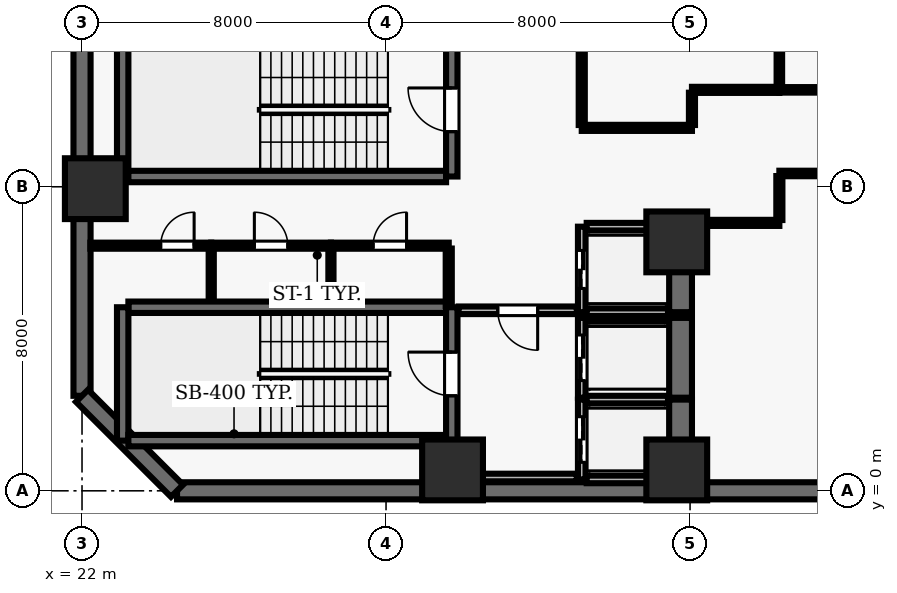
"""IFC4 building model, lengths in metres.
Left out: names, types, materials, properties, quantities, classifications, styles, units other than length and angle.
Written with IfcOpenShell. Run it as: python <this file> out.ifc"""

import sys

from ifc_helpers import new_model, si_unit, direction, frame, frame_2d, origin, origin_2d, place, context, subcontext, project, spatial, rectangle, extrude, element, fill, save


model = new_model("IFC4")
c1 = context("Model", 3, precision=1e-05, world=origin(), true_north=direction((0.0, 1.0)))
c2 = subcontext(c1, "Body", "Model", "MODEL_VIEW")
j1 = project(units=[si_unit("LENGTHUNIT", "METRE"), si_unit("PLANEANGLEUNIT", "RADIAN")], contexts=[c1])
p1 = place(None, origin())
s1 = spatial("IfcSite", under=j1, at=p1, CompositionType="ELEMENT")
p2 = place(p1, origin())
s2 = spatial("IfcBuilding", under=s1, at=p2, CompositionType="ELEMENT")
p3 = place(p2, frame((0.0, 0.0, -9.0)))
s3 = spatial("IfcBuildingStorey", under=s2, at=p3, CompositionType="ELEMENT", Elevation=-9.0)
for number, where, z_axis, x_axis in (
    (1, (31.75, 0.55, 0.0), (0.0, 0.0, 1.0), (1.0, 0.0, 0.0)),
    (2, (37.65, 0.55, 0.0), (0.0, 0.0, 1.0), (1.0, 0.0, 0.0)),
    (3, (22.35, 7.95, 0.0), (0.0, 0.0, 1.0), (1.0, 0.0, 0.0)),
    (4, (37.65, 6.55, 0.0), (0.0, 0.0, 1.0), (1.0, 0.0, 0.0)),
):
    element("IfcColumn", number, at=place(p3, frame(where, z_axis=z_axis, x_axis=x_axis)), inside=s3, PredefinedType="COLUMN", context=c2, shape_type="SweptSolid", body=[
        extrude(rectangle(XDim=1.6, YDim=1.6, at=origin_2d()), origin(), (0.0, 0.0, 1.0), 4.5),
    ])
for number, where, z_axis, x_axis in (
    (5, (24.5, 0.0, 0.0), (0.0, 0.0, 1.0), (1.0, 0.0, 0.0)),
    (6, (22.0, 51.5, 0.0), (0.0, 0.0, 1.0), (0.0, -1.0, 0.0)),
):
    element("IfcWall", number, at=place(p3, frame(where, z_axis=z_axis, x_axis=x_axis)), inside=s3, PredefinedType="USERDEFINED", context=c2, shape_type="SweptSolid", body=[
        extrude(rectangle(XDim=49.0, YDim=0.45, at=frame_2d((24.5, 0.0))), origin(), (0.0, 0.0, 1.0), 4.22),
    ])
p4 = place(p3, frame((22.0, 2.5, 0.0), z_axis=(0.0, 0.0, 1.0), x_axis=(0.707106781187, -0.707106781187, 0.0)))
e7 = element("IfcWall", 7, at=p4, inside=s3, PredefinedType="USERDEFINED", context=c2, shape_type="SweptSolid", body=[
    extrude(rectangle(XDim=3.536, YDim=0.45, at=frame_2d((1.768, 0.0))), origin(), (0.0, 0.0, 1.0), 4.22),
])
p5 = place(p3, frame((31.58, 4.83, 0.0), z_axis=(0.0, 0.0, 1.0), x_axis=(-1.0, 0.0, 0.0)))
e8 = element("IfcWall", 8, at=p5, inside=s3, PredefinedType="SHEAR", context=c2, shape_type="SweptSolid", body=[
    extrude(rectangle(XDim=8.36, YDim=0.3, at=frame_2d((4.18, 0.0))), origin(), (0.0, 0.0, 1.0), 4.22),
])
p6 = place(p3, frame((23.07, 4.83, 0.0), z_axis=(0.0, 0.0, 1.0), x_axis=(0.0, -1.0, 0.0)))
e9 = element("IfcWall", 9, at=p6, inside=s3, PredefinedType="SHEAR", context=c2, shape_type="SweptSolid", body=[
    extrude(rectangle(XDim=3.51, YDim=0.3, at=frame_2d((1.755, 0.0))), origin(), (0.0, 0.0, 1.0), 4.22),
])
p7 = place(p3, frame((23.22, 1.32, 0.0), z_axis=(0.0, 0.0, 1.0), x_axis=(1.0, 0.0, 0.0)))
e10 = element("IfcWall", 10, at=p7, inside=s3, PredefinedType="SHEAR", context=c2, shape_type="SweptSolid", body=[
    extrude(rectangle(XDim=8.36, YDim=0.3, at=frame_2d((4.18, 0.0))), origin(), (0.0, 0.0, 1.0), 4.22),
])
p8 = place(p3, frame((31.73, 0.96, 0.0), z_axis=(0.0, 0.0, 1.0), x_axis=(0.0, 1.0, 0.0)))
e11 = element("IfcWall", 11, at=p8, inside=s3, PredefinedType="SHEAR", context=c2, shape_type="SweptSolid", body=[
    extrude(rectangle(XDim=3.87, YDim=0.3, at=frame_2d((1.935, 0.0))), origin(), (0.0, 0.0, 1.0), 4.22),
])
p9 = place(p8, frame((1.54, 0.0, 0.0)))
e12 = element("IfcOpeningElement", 12, at=p9, cuts=e11, PredefinedType="OPENING", context=c2, shape_type="SweptSolid", body=[
    extrude(rectangle(XDim=1.15, YDim=2.15, at=frame_2d((0.575, 1.075))), frame((0.0, 0.16, 0.0), z_axis=(0.0, -1.0, 0.0), x_axis=(1.0, 0.0, 0.0)), (0.0, 0.0, 1.0), 0.32),
])
p10 = place(p3, frame((23.07, 11.78, 0.0), z_axis=(0.0, 0.0, 1.0), x_axis=(0.0, -1.0, 0.0)))
e13 = element("IfcWall", 13, at=p10, inside=s3, PredefinedType="SHEAR", context=c2, shape_type="SweptSolid", body=[
    extrude(rectangle(XDim=3.51, YDim=0.3, at=frame_2d((1.755, 0.0))), origin(), (0.0, 0.0, 1.0), 4.22),
])
p11 = place(p3, frame((23.22, 8.27, 0.0), z_axis=(0.0, 0.0, 1.0), x_axis=(1.0, 0.0, 0.0)))
e14 = element("IfcWall", 14, at=p11, inside=s3, PredefinedType="SHEAR", context=c2, shape_type="SweptSolid", body=[
    extrude(rectangle(XDim=8.36, YDim=0.3, at=frame_2d((4.18, 0.0))), origin(), (0.0, 0.0, 1.0), 4.22),
])
p12 = place(p3, frame((31.73, 8.27, 0.0), z_axis=(0.0, 0.0, 1.0), x_axis=(0.0, 1.0, 0.0)))
e15 = element("IfcWall", 15, at=p12, inside=s3, PredefinedType="SHEAR", context=c2, shape_type="SweptSolid", body=[
    extrude(rectangle(XDim=3.51, YDim=0.3, at=frame_2d((1.755, 0.0))), origin(), (0.0, 0.0, 1.0), 4.22),
])
p13 = place(p12, frame((1.18, 0.0, 0.0)))
e16 = element("IfcOpeningElement", 16, at=p13, cuts=e15, PredefinedType="OPENING", context=c2, shape_type="SweptSolid", body=[
    extrude(rectangle(XDim=1.15, YDim=2.15, at=frame_2d((0.575, 1.075))), frame((0.0, 0.16, 0.0), z_axis=(0.0, -1.0, 0.0), x_axis=(1.0, 0.0, 0.0)), (0.0, 0.0, 1.0), 0.32),
])
p14 = place(p3, frame((35.15, 2.4, 0.0), z_axis=(0.0, 0.0, 1.0), x_axis=(0.0, -1.0, 0.0)))
e17 = element("IfcWall", 17, at=p14, inside=s3, PredefinedType="SOLIDWALL", context=c2, shape_type="SweptSolid", body=[
    extrude(rectangle(XDim=2.1, YDim=0.2, at=frame_2d((1.05, 0.0))), origin(), (0.0, 0.0, 1.0), 4.22),
])
p15 = place(p14, frame((0.45, 0.0, 0.0)))
e18 = element("IfcOpeningElement", 18, at=p15, cuts=e17, PredefinedType="OPENING", context=c2, shape_type="SweptSolid", body=[
    extrude(rectangle(XDim=1.2, YDim=2.15, at=frame_2d((0.6, 1.075))), frame((0.0, 0.11, 0.0), z_axis=(0.0, -1.0, 0.0), x_axis=(1.0, 0.0, 0.0)), (0.0, 0.0, 1.0), 0.22),
])
p16 = place(p3, frame((37.75, 0.3, 0.0), z_axis=(0.0, 0.0, 1.0), x_axis=(0.0, 1.0, 0.0)))
e19 = element("IfcWall", 19, at=p16, inside=s3, PredefinedType="SHEAR", context=c2, shape_type="SweptSolid", body=[
    extrude(rectangle(XDim=2.1, YDim=0.6, at=frame_2d((1.05, 0.0))), origin(), (0.0, 0.0, 1.0), 4.22),
])
for number, where, z_axis, x_axis in (
    (20, (35.28, 0.3, 0.0), (0.0, 0.0, 1.0), (1.0, 0.0, 0.0)),
    (21, (37.42, 2.4, 0.0), (0.0, 0.0, 1.0), (-1.0, 0.0, 0.0)),
):
    element("IfcWall", number, at=place(p3, frame(where, z_axis=z_axis, x_axis=x_axis)), inside=s3, PredefinedType="SOLIDWALL", context=c2, shape_type="SweptSolid", body=[
        extrude(rectangle(XDim=2.14, YDim=0.2, at=frame_2d((1.07, 0.0))), origin(), (0.0, 0.0, 1.0), 4.22),
    ])
p17 = place(p3, frame((35.15, 4.55, 0.0), z_axis=(0.0, 0.0, 1.0), x_axis=(0.0, -1.0, 0.0)))
e22 = element("IfcWall", 22, at=p17, inside=s3, PredefinedType="SOLIDWALL", context=c2, shape_type="SweptSolid", body=[
    extrude(rectangle(XDim=2.1, YDim=0.2, at=frame_2d((1.05, 0.0))), origin(), (0.0, 0.0, 1.0), 4.22),
])
p18 = place(p17, frame((0.45, 0.0, 0.0)))
e23 = element("IfcOpeningElement", 23, at=p18, cuts=e22, PredefinedType="OPENING", context=c2, shape_type="SweptSolid", body=[
    extrude(rectangle(XDim=1.2, YDim=2.15, at=frame_2d((0.6, 1.075))), frame((0.0, 0.11, 0.0), z_axis=(0.0, -1.0, 0.0), x_axis=(1.0, 0.0, 0.0)), (0.0, 0.0, 1.0), 0.22),
])
p19 = place(p3, frame((37.75, 2.45, 0.0), z_axis=(0.0, 0.0, 1.0), x_axis=(0.0, 1.0, 0.0)))
e24 = element("IfcWall", 24, at=p19, inside=s3, PredefinedType="SHEAR", context=c2, shape_type="SweptSolid", body=[
    extrude(rectangle(XDim=2.1, YDim=0.6, at=frame_2d((1.05, 0.0))), origin(), (0.0, 0.0, 1.0), 4.22),
])
p20 = place(p3, frame((37.42, 4.55, 0.0), z_axis=(0.0, 0.0, 1.0), x_axis=(-1.0, 0.0, 0.0)))
e25 = element("IfcWall", 25, at=p20, inside=s3, PredefinedType="SOLIDWALL", context=c2, shape_type="SweptSolid", body=[
    extrude(rectangle(XDim=2.14, YDim=0.2, at=frame_2d((1.07, 0.0))), origin(), (0.0, 0.0, 1.0), 4.22),
])
p21 = place(p3, frame((35.15, 6.95, 0.0), z_axis=(0.0, 0.0, 1.0), x_axis=(0.0, -1.0, 0.0)))
e26 = element("IfcWall", 26, at=p21, inside=s3, PredefinedType="SOLIDWALL", context=c2, shape_type="SweptSolid", body=[
    extrude(rectangle(XDim=2.25, YDim=0.2, at=frame_2d((1.125, 0.0))), origin(), (0.0, 0.0, 1.0), 4.22),
])
p22 = place(p21, frame((0.625, 0.0, 0.0)))
e27 = element("IfcOpeningElement", 27, at=p22, cuts=e26, PredefinedType="OPENING", context=c2, shape_type="SweptSolid", body=[
    extrude(rectangle(XDim=1.0, YDim=2.1, at=frame_2d((0.5, 1.05))), frame((0.0, 0.11, 0.0), z_axis=(0.0, -1.0, 0.0), x_axis=(1.0, 0.0, 0.0)), (0.0, 0.0, 1.0), 0.22),
])
p23 = place(p3, frame((37.75, 4.7, 0.0), z_axis=(0.0, 0.0, 1.0), x_axis=(0.0, 1.0, 0.0)))
e28 = element("IfcWall", 28, at=p23, inside=s3, PredefinedType="SHEAR", context=c2, shape_type="SweptSolid", body=[
    extrude(rectangle(XDim=2.25, YDim=0.6, at=frame_2d((1.125, 0.0))), origin(), (0.0, 0.0, 1.0), 4.22),
])
for number, where, z_axis, x_axis in (
    (29, (35.28, 4.7, 0.0), (0.0, 0.0, 1.0), (1.0, 0.0, 0.0)),
    (30, (37.42, 6.95, 0.0), (0.0, 0.0, 1.0), (-1.0, 0.0, 0.0)),
):
    element("IfcWall", number, at=place(p3, frame(where, z_axis=z_axis, x_axis=x_axis)), inside=s3, PredefinedType="SOLIDWALL", context=c2, shape_type="SweptSolid", body=[
        extrude(rectangle(XDim=2.14, YDim=0.2, at=frame_2d((1.07, 0.0))), origin(), (0.0, 0.0, 1.0), 4.22),
    ])
p24 = place(p3, frame((22.22, 6.45, 0.0), z_axis=(0.0, 0.0, 1.0), x_axis=(1.0, 0.0, 0.0)))
e31 = element("IfcWall", 31, at=p24, inside=s3, PredefinedType="PARTITIONING", context=c2, shape_type="SweptSolid", body=[
    extrude(rectangle(XDim=3.18, YDim=0.16, at=frame_2d((1.59, 0.0))), origin(), (0.0, 0.0, 1.0), 4.22),
])
p25 = place(p24, frame((1.85, 0.0, 0.0)))
e32 = element("IfcOpeningElement", 32, at=p25, cuts=e31, PredefinedType="OPENING", context=c2, shape_type="SweptSolid", body=[
    extrude(rectangle(XDim=0.88, YDim=2.1, at=frame_2d((0.44, 1.05))), frame((0.0, 0.09, 0.0), z_axis=(0.0, -1.0, 0.0), x_axis=(1.0, 0.0, 0.0)), (0.0, 0.0, 1.0), 0.18),
])
p26 = place(p3, frame((25.4, 6.45, 0.0), z_axis=(0.0, 0.0, 1.0), x_axis=(1.0, 0.0, 0.0)))
e33 = element("IfcWall", 33, at=p26, inside=s3, PredefinedType="PARTITIONING", context=c2, shape_type="SweptSolid", body=[
    extrude(rectangle(XDim=3.15, YDim=0.16, at=frame_2d((1.575, 0.0))), origin(), (0.0, 0.0, 1.0), 4.22),
])
p27 = place(p26, frame((1.135, 0.0, 0.0)))
e34 = element("IfcOpeningElement", 34, at=p27, cuts=e33, PredefinedType="OPENING", context=c2, shape_type="SweptSolid", body=[
    extrude(rectangle(XDim=0.88, YDim=2.1, at=frame_2d((0.44, 1.05))), frame((0.0, 0.09, 0.0), z_axis=(0.0, -1.0, 0.0), x_axis=(1.0, 0.0, 0.0)), (0.0, 0.0, 1.0), 0.18),
])
p28 = place(p3, frame((28.55, 6.45, 0.0), z_axis=(0.0, 0.0, 1.0), x_axis=(1.0, 0.0, 0.0)))
e35 = element("IfcWall", 35, at=p28, inside=s3, PredefinedType="PARTITIONING", context=c2, shape_type="SweptSolid", body=[
    extrude(rectangle(XDim=3.1, YDim=0.16, at=frame_2d((1.55, 0.0))), origin(), (0.0, 0.0, 1.0), 4.22),
])
p29 = place(p28, frame((1.11, 0.0, 0.0)))
e36 = element("IfcOpeningElement", 36, at=p29, cuts=e35, PredefinedType="OPENING", context=c2, shape_type="SweptSolid", body=[
    extrude(rectangle(XDim=0.88, YDim=2.1, at=frame_2d((0.44, 1.05))), frame((0.0, 0.09, 0.0), z_axis=(0.0, -1.0, 0.0), x_axis=(1.0, 0.0, 0.0)), (0.0, 0.0, 1.0), 0.18),
])
p30 = place(p3, frame((31.65, 0.35, 0.0), z_axis=(0.0, 0.0, 1.0), x_axis=(1.0, 0.0, 0.0)))
e37 = element("IfcWall", 37, at=p30, inside=s3, PredefinedType="SOLIDWALL", context=c2, shape_type="SweptSolid", body=[
    extrude(rectangle(XDim=3.37, YDim=0.2, at=frame_2d((1.685, 0.0))), origin(), (0.0, 0.0, 1.0), 4.22),
])
p31 = place(p3, frame((35.02, 4.75, 0.0), z_axis=(0.0, 0.0, 1.0), x_axis=(-1.0, 0.0, 0.0)))
e38 = element("IfcWall", 38, at=p31, inside=s3, PredefinedType="SOLIDWALL", context=c2, shape_type="SweptSolid", body=[
    extrude(rectangle(XDim=3.11, YDim=0.2, at=frame_2d((1.555, 0.0))), origin(), (0.0, 0.0, 1.0), 4.22),
])
p32 = place(p31, frame((1.03, 0.0, 0.0)))
e39 = element("IfcOpeningElement", 39, at=p32, cuts=e38, PredefinedType="OPENING", context=c2, shape_type="SweptSolid", body=[
    extrude(rectangle(XDim=1.05, YDim=2.15, at=frame_2d((0.525, 1.075))), frame((0.0, 0.11, 0.0), z_axis=(0.0, -1.0, 0.0), x_axis=(1.0, 0.0, 0.0)), (0.0, 0.0, 1.0), 0.22),
])
p33 = place(p3, frame((38.05, 7.05, 0.0), z_axis=(0.0, 0.0, 1.0), x_axis=(1.0, 0.0, 0.0)))
e40 = element("IfcWall", 40, at=p33, inside=s3, PredefinedType="PARTITIONING", context=c2, shape_type="SweptSolid", body=[
    extrude(rectangle(XDim=2.3, YDim=0.16, at=frame_2d((1.15, 0.0))), origin(), (0.0, 0.0, 1.0), 4.22),
])
p34 = place(p3, frame((38.05, 9.55, 0.0), z_axis=(0.0, 0.0, 1.0), x_axis=(-1.0, 0.0, 0.0)))
e41 = element("IfcWall", 41, at=p34, inside=s3, PredefinedType="PARTITIONING", context=c2, shape_type="SweptSolid", body=[
    extrude(rectangle(XDim=2.9, YDim=0.16, at=frame_2d((1.45, 0.0))), origin(), (0.0, 0.0, 1.0), 4.22),
])
p35 = place(p3, frame((40.35, 8.35, 0.0), z_axis=(0.0, 0.0, 1.0), x_axis=(1.0, 0.0, 0.0)))
e42 = element("IfcWall", 42, at=p35, inside=s3, PredefinedType="PARTITIONING", context=c2, shape_type="SweptSolid", body=[
    extrude(rectangle(XDim=17.45, YDim=0.145, at=frame_2d((8.725, 0.0))), origin(), (0.0, 0.0, 1.0), 3.365),
])
p36 = place(p35, frame((8.275, 0.0, 0.0)))
e43 = element("IfcOpeningElement", 43, at=p36, cuts=e42, PredefinedType="OPENING", context=c2, shape_type="SweptSolid", body=[
    extrude(rectangle(XDim=0.9, YDim=2.1, at=frame_2d((0.45, 1.05))), frame((0.0, 0.083, 0.0), z_axis=(0.0, -1.0, 0.0), x_axis=(1.0, 0.0, 0.0)), (0.0, 0.0, 1.0), 0.165),
])
p37 = place(p3, frame((40.35, 10.55, 0.0), z_axis=(0.0, 0.0, 1.0), x_axis=(-1.0, 0.0, 0.0)))
e44 = element("IfcWall", 44, at=p37, inside=s3, PredefinedType="PARTITIONING", context=c2, shape_type="SweptSolid", body=[
    extrude(rectangle(XDim=2.3, YDim=0.16, at=frame_2d((1.15, 0.0))), origin(), (0.0, 0.0, 1.0), 3.751),
])
p38 = place(p3, frame((75.78, 10.55, 0.0), z_axis=(0.0, 0.0, 1.0), x_axis=(-1.0, 0.0, 0.0)))
e45 = element("IfcWall", 45, at=p38, inside=s3, PredefinedType="PARTITIONING", context=c2, shape_type="SweptSolid", body=[
    extrude(rectangle(XDim=35.43, YDim=0.145, at=frame_2d((17.715, 0.0))), origin(), (0.0, 0.0, 1.0), 3.751),
])
p39 = place(p38, frame((17.265, 0.0, 0.0)))
e46 = element("IfcOpeningElement", 46, at=p39, cuts=e45, PredefinedType="OPENING", context=c2, shape_type="SweptSolid", body=[
    extrude(rectangle(XDim=0.9, YDim=2.1, at=frame_2d((0.45, 1.05))), frame((0.0, 0.083, 0.0), z_axis=(0.0, -1.0, 0.0), x_axis=(1.0, 0.0, 0.0)), (0.0, 0.0, 1.0), 0.165),
])
for number, where, z_axis, x_axis in (
    (47, (25.4, 5.01, 0.0), (0.0, 0.0, 1.0), (0.0, 1.0, 0.0)),
    (48, (28.55, 5.01, 0.0), (0.0, 0.0, 1.0), (0.0, 1.0, 0.0)),
):
    element("IfcWall", number, at=place(p3, frame(where, z_axis=z_axis, x_axis=x_axis)), inside=s3, PredefinedType="PARTITIONING", context=c2, shape_type="SweptSolid", body=[
        extrude(rectangle(XDim=1.365, YDim=0.135, at=frame_2d((0.683, 0.0))), origin(), (0.0, 0.0, 1.0), 4.22),
    ])
p40 = place(p3, frame((31.65, 4.86, 0.0), z_axis=(0.0, 0.0, 1.0), x_axis=(0.0, 1.0, 0.0)))
e49 = element("IfcWall", 49, at=p40, inside=s3, PredefinedType="PARTITIONING", context=c2, shape_type="SweptSolid", body=[
    extrude(rectangle(XDim=1.515, YDim=0.16, at=frame_2d((0.757, 0.0))), origin(), (0.0, 0.0, 1.0), 4.22),
])
p41 = place(p3, frame((35.15, 9.625, 0.0), z_axis=(0.0, 0.0, 1.0), x_axis=(0.0, 1.0, 0.0)))
e50 = element("IfcWall", 50, at=p41, inside=s3, PredefinedType="PARTITIONING", context=c2, shape_type="SweptSolid", body=[
    extrude(rectangle(XDim=14.225, YDim=0.16, at=frame_2d((7.113, 0.0))), origin(), (0.0, 0.0, 1.0), 4.22),
])
p42 = place(p3, frame((38.05, 10.475, 0.0), z_axis=(0.0, 0.0, 1.0), x_axis=(0.0, -1.0, 0.0)))
e51 = element("IfcWall", 51, at=p42, inside=s3, PredefinedType="PARTITIONING", context=c2, shape_type="SweptSolid", body=[
    extrude(rectangle(XDim=0.85, YDim=0.16, at=frame_2d((0.425, 0.0))), origin(), (0.0, 0.0, 1.0), 3.365),
])
p43 = place(p3, frame((40.35, 7.125, 0.0), z_axis=(0.0, 0.0, 1.0), x_axis=(0.0, 1.0, 0.0)))
e52 = element("IfcWall", 52, at=p43, inside=s3, PredefinedType="PARTITIONING", context=c2, shape_type="SweptSolid", body=[
    extrude(rectangle(XDim=1.157, YDim=0.16, at=frame_2d((0.579, 0.0))), origin(), (0.0, 0.0, 1.0), 4.22),
])
p44 = place(p3, frame((40.35, 16.133, 0.0), z_axis=(0.0, 0.0, 1.0), x_axis=(0.0, -1.0, 0.0)))
e53 = element("IfcWall", 53, at=p44, inside=s3, PredefinedType="PARTITIONING", context=c2, shape_type="SweptSolid", body=[
    extrude(rectangle(XDim=5.508, YDim=0.145, at=frame_2d((2.754, 0.0))), origin(), (0.0, 0.0, 1.0), 3.751),
])
p45 = place(p9, origin())
e54 = element("IfcDoor", 54, at=p45, inside=s3, OperationType="SINGLE_SWING_RIGHT", PredefinedType="DOOR", context=c2, shape_type="SweptSolid", body=[
    extrude(rectangle(XDim=1.15, YDim=2.15, at=frame_2d((0.575, 1.075))), frame((0.0, 0.025, 0.0), z_axis=(0.0, -1.0, 0.0), x_axis=(1.0, 0.0, 0.0)), (0.0, 0.0, 1.0), 0.05),
])
fill(e12, e54)
p46 = place(p13, origin())
e55 = element("IfcDoor", 55, at=p46, inside=s3, OperationType="SINGLE_SWING_RIGHT", PredefinedType="DOOR", context=c2, shape_type="SweptSolid", body=[
    extrude(rectangle(XDim=1.15, YDim=2.15, at=frame_2d((0.575, 1.075))), frame((0.0, 0.025, 0.0), z_axis=(0.0, -1.0, 0.0), x_axis=(1.0, 0.0, 0.0)), (0.0, 0.0, 1.0), 0.05),
])
fill(e16, e55)
p47 = place(p15, origin())
e56 = element("IfcDoor", 56, at=p47, inside=s3, OperationType="DOUBLE_DOOR_SLIDING", PredefinedType="DOOR", context=c2, shape_type="SweptSolid", body=[
    extrude(rectangle(XDim=1.2, YDim=2.15, at=frame_2d((0.6, 1.075))), frame((0.0, 0.025, 0.0), z_axis=(0.0, -1.0, 0.0), x_axis=(1.0, 0.0, 0.0)), (0.0, 0.0, 1.0), 0.05),
])
fill(e18, e56)
p48 = place(p18, origin())
e57 = element("IfcDoor", 57, at=p48, inside=s3, OperationType="DOUBLE_DOOR_SLIDING", PredefinedType="DOOR", context=c2, shape_type="SweptSolid", body=[
    extrude(rectangle(XDim=1.2, YDim=2.15, at=frame_2d((0.6, 1.075))), frame((0.0, 0.025, 0.0), z_axis=(0.0, -1.0, 0.0), x_axis=(1.0, 0.0, 0.0)), (0.0, 0.0, 1.0), 0.05),
])
fill(e23, e57)
p49 = place(p22, origin())
e58 = element("IfcDoor", 58, at=p49, inside=s3, OperationType="DOUBLE_DOOR_SLIDING", PredefinedType="DOOR", context=c2, shape_type="SweptSolid", body=[
    extrude(rectangle(XDim=1.0, YDim=2.1, at=frame_2d((0.5, 1.05))), frame((0.0, 0.025, 0.0), z_axis=(0.0, -1.0, 0.0), x_axis=(1.0, 0.0, 0.0)), (0.0, 0.0, 1.0), 0.05),
])
fill(e27, e58)
p50 = place(p32, origin())
e59 = element("IfcDoor", 59, at=p50, inside=s3, OperationType="SINGLE_SWING_LEFT", PredefinedType="DOOR", context=c2, shape_type="SweptSolid", body=[
    extrude(rectangle(XDim=1.05, YDim=2.15, at=frame_2d((0.525, 1.075))), frame((0.0, 0.025, 0.0), z_axis=(0.0, -1.0, 0.0), x_axis=(1.0, 0.0, 0.0)), (0.0, 0.0, 1.0), 0.05),
])
fill(e39, e59)
p51 = place(p25, origin())
e60 = element("IfcDoor", 60, at=p51, inside=s3, OperationType="SINGLE_SWING_RIGHT", PredefinedType="DOOR", context=c2, shape_type="SweptSolid", body=[
    extrude(rectangle(XDim=0.88, YDim=2.1, at=frame_2d((0.44, 1.05))), frame((0.0, 0.025, 0.0), z_axis=(0.0, -1.0, 0.0), x_axis=(1.0, 0.0, 0.0)), (0.0, 0.0, 1.0), 0.05),
])
fill(e32, e60)
p52 = place(p27, origin())
e61 = element("IfcDoor", 61, at=p52, inside=s3, OperationType="SINGLE_SWING_LEFT", PredefinedType="DOOR", context=c2, shape_type="SweptSolid", body=[
    extrude(rectangle(XDim=0.88, YDim=2.1, at=frame_2d((0.44, 1.05))), frame((0.0, 0.025, 0.0), z_axis=(0.0, -1.0, 0.0), x_axis=(1.0, 0.0, 0.0)), (0.0, 0.0, 1.0), 0.05),
])
fill(e34, e61)
p53 = place(p29, origin())
e62 = element("IfcDoor", 62, at=p53, inside=s3, OperationType="SINGLE_SWING_RIGHT", PredefinedType="DOOR", context=c2, shape_type="SweptSolid", body=[
    extrude(rectangle(XDim=0.88, YDim=2.1, at=frame_2d((0.44, 1.05))), frame((0.0, 0.025, 0.0), z_axis=(0.0, -1.0, 0.0), x_axis=(1.0, 0.0, 0.0)), (0.0, 0.0, 1.0), 0.05),
])
fill(e36, e62)
save(model, sys.argv[1])
